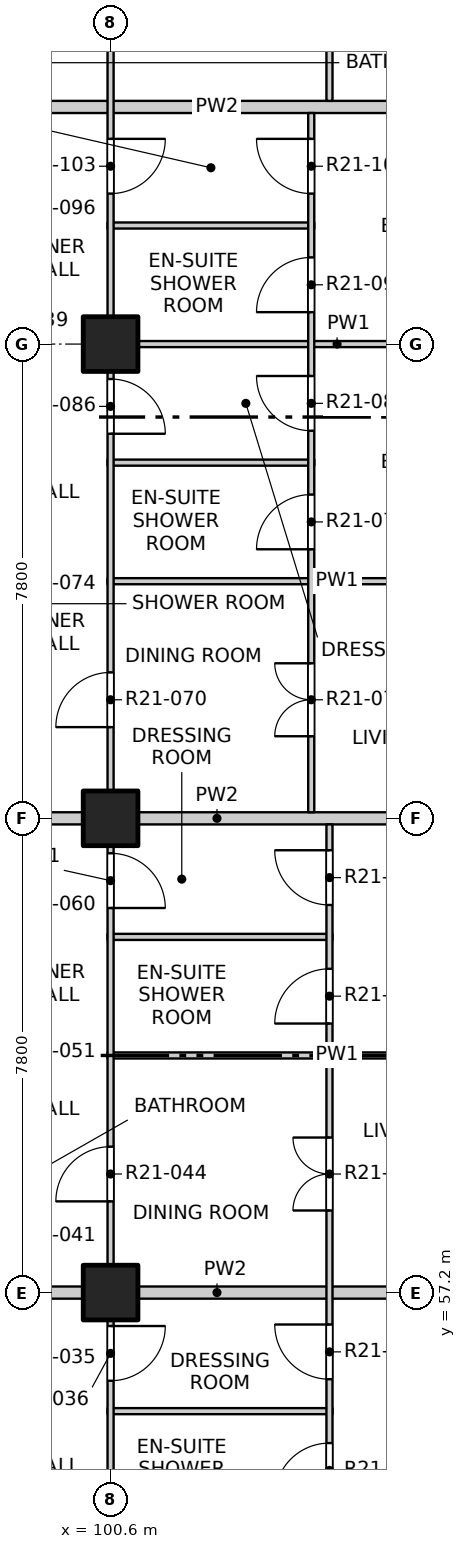
"""IFC4 building model, lengths in metres.
Left out: names, types, materials, properties, quantities, classifications, styles, units other than length and angle.
Written with IfcOpenShell. Run it as: python <this file> out.ifc"""

import sys

from ifc_helpers import new_model, si_unit, direction, frame, frame_2d, origin, origin_2d, place, context, subcontext, project, spatial, rectangle, extrude, element, fill, save


model = new_model("IFC4")
c1 = context("Model", 3, precision=1e-05, world=origin(), true_north=direction((0.0, 1.0)))
c2 = subcontext(c1, "Body", "Model", "MODEL_VIEW")
j1 = project(units=[si_unit("LENGTHUNIT", "METRE"), si_unit("PLANEANGLEUNIT", "RADIAN")], contexts=[c1])
p1 = place(None, origin())
s1 = spatial("IfcSite", under=j1, at=p1, CompositionType="ELEMENT")
p2 = place(p1, origin())
s2 = spatial("IfcBuilding", under=s1, at=p2, CompositionType="ELEMENT")
p3 = place(p2, frame((0.0, 0.0, 221.1)))
s3 = spatial("IfcBuildingStorey", under=s2, at=p3, CompositionType="ELEMENT", Elevation=221.1)
for number, where, z_axis, x_axis in (
    (1, (100.6, 57.2, -0.25), (0.0, 0.0, 1.0), (1.0, 0.0, 0.0)),
    (2, (100.6, 65.0, -0.25), (0.0, 0.0, 1.0), (1.0, 0.0, 0.0)),
    (3, (100.6, 72.8, -0.25), (0.0, 0.0, 1.0), (1.0, 0.0, 0.0)),
):
    element("IfcColumn", number, at=place(p3, frame(where, z_axis=z_axis, x_axis=x_axis)), inside=s3, PredefinedType="COLUMN", context=c2, shape_type="SweptSolid", body=[
        extrude(rectangle(XDim=0.9, YDim=0.9, at=origin_2d()), origin(), (0.0, 0.0, 1.0), 3.4),
    ])
p4 = place(p3, frame((100.55, 55.25, 0.0), z_axis=(0.0, 0.0, 1.0), x_axis=(1.0, 0.0, 0.0)))
e4 = element("IfcWall", 4, at=p4, inside=s3, PredefinedType="PARTITIONING", context=c2, shape_type="SweptSolid", body=[
    extrude(rectangle(XDim=3.7, YDim=0.1, at=frame_2d((1.85, 0.0))), origin(), (0.0, 0.0, 1.0), 3.15),
])
p5 = place(p3, frame((96.6, 57.2, 0.0), z_axis=(0.0, 0.0, 1.0), x_axis=(1.0, 0.0, 0.0)))
e5 = element("IfcWall", 5, at=p5, inside=s3, PredefinedType="PARTITIONING", context=c2, shape_type="SweptSolid", body=[
    extrude(rectangle(XDim=11.5, YDim=0.2, at=frame_2d((5.75, 0.0))), origin(), (0.0, 0.0, 1.0), 3.15),
])
p6 = place(p3, frame((100.55, 61.1, 0.0), z_axis=(0.0, 0.0, 1.0), x_axis=(1.0, 0.0, 0.0)))
e6 = element("IfcWall", 6, at=p6, inside=s3, PredefinedType="PARTITIONING", context=c2, shape_type="SweptSolid", body=[
    extrude(rectangle(XDim=7.55, YDim=0.1, at=frame_2d((3.775, 0.0))), origin(), (0.0, 0.0, 1.0), 2.55),
])
p7 = place(p3, frame((100.55, 63.05, 0.0), z_axis=(0.0, 0.0, 1.0), x_axis=(1.0, 0.0, 0.0)))
e7 = element("IfcWall", 7, at=p7, inside=s3, PredefinedType="PARTITIONING", context=c2, shape_type="SweptSolid", body=[
    extrude(rectangle(XDim=3.7, YDim=0.1, at=frame_2d((1.85, 0.0))), origin(), (0.0, 0.0, 1.0), 3.15),
])
p8 = place(p3, frame((96.6, 65.0, 0.0), z_axis=(0.0, 0.0, 1.0), x_axis=(1.0, 0.0, 0.0)))
e8 = element("IfcWall", 8, at=p8, inside=s3, PredefinedType="PARTITIONING", context=c2, shape_type="SweptSolid", body=[
    extrude(rectangle(XDim=11.5, YDim=0.2, at=frame_2d((5.75, 0.0))), origin(), (0.0, 0.0, 1.0), 3.15),
])
p9 = place(p3, frame((100.55, 68.9, 0.0), z_axis=(0.0, 0.0, 1.0), x_axis=(1.0, 0.0, 0.0)))
e9 = element("IfcWall", 9, at=p9, inside=s3, PredefinedType="PARTITIONING", context=c2, shape_type="SweptSolid", body=[
    extrude(rectangle(XDim=7.55, YDim=0.1, at=frame_2d((3.775, 0.0))), origin(), (0.0, 0.0, 1.0), 2.55),
])
p10 = place(p3, frame((100.55, 70.85, 0.0), z_axis=(0.0, 0.0, 1.0), x_axis=(1.0, 0.0, 0.0)))
e10 = element("IfcWall", 10, at=p10, inside=s3, PredefinedType="PARTITIONING", context=c2, shape_type="SweptSolid", body=[
    extrude(rectangle(XDim=3.4, YDim=0.1, at=frame_2d((1.7, 0.0))), origin(), (0.0, 0.0, 1.0), 3.15),
])
p11 = place(p3, frame((100.55, 72.8, 0.0), z_axis=(0.0, 0.0, 1.0), x_axis=(1.0, 0.0, 0.0)))
e11 = element("IfcWall", 11, at=p11, inside=s3, PredefinedType="PARTITIONING", context=c2, shape_type="SweptSolid", body=[
    extrude(rectangle(XDim=7.55, YDim=0.1, at=frame_2d((3.775, 0.0))), origin(), (0.0, 0.0, 1.0), 3.15),
])
p12 = place(p3, frame((100.55, 74.75, 0.0), z_axis=(0.0, 0.0, 1.0), x_axis=(1.0, 0.0, 0.0)))
e12 = element("IfcWall", 12, at=p12, inside=s3, PredefinedType="PARTITIONING", context=c2, shape_type="SweptSolid", body=[
    extrude(rectangle(XDim=3.4, YDim=0.1, at=frame_2d((1.7, 0.0))), origin(), (0.0, 0.0, 1.0), 3.15),
])
p13 = place(p3, frame((96.6, 76.7, 0.0), z_axis=(0.0, 0.0, 1.0), x_axis=(1.0, 0.0, 0.0)))
e13 = element("IfcWall", 13, at=p13, inside=s3, PredefinedType="PARTITIONING", context=c2, shape_type="SweptSolid", body=[
    extrude(rectangle(XDim=11.5, YDim=0.2, at=frame_2d((5.75, 0.0))), origin(), (0.0, 0.0, 1.0), 2.55),
])
p14 = place(p3, frame((100.6, 41.9, 0.0), z_axis=(0.0, 0.0, 1.0), x_axis=(0.0, 1.0, 0.0)))
e14 = element("IfcWall", 14, at=p14, inside=s3, PredefinedType="PARTITIONING", context=c2, shape_type="SweptSolid", body=[
    extrude(rectangle(XDim=46.2, YDim=0.1, at=frame_2d((23.1, 0.0))), origin(), (0.0, 0.0, 1.0), 3.15),
])
p15 = place(p14, frame((1.2, 0.0, 0.0)))
e15 = element("IfcOpeningElement", 15, at=p15, cuts=e14, PredefinedType="OPENING", context=c2, shape_type="SweptSolid", body=[
    extrude(rectangle(XDim=0.9, YDim=2.1, at=frame_2d((0.45, 1.05))), frame((0.0, 0.06, 0.0), z_axis=(0.0, -1.0, 0.0), x_axis=(1.0, 0.0, 0.0)), (0.0, 0.0, 1.0), 0.12),
])
p16 = place(p14, frame((6.025, 0.0, 0.0)))
e16 = element("IfcOpeningElement", 16, at=p16, cuts=e14, PredefinedType="OPENING", context=c2, shape_type="SweptSolid", body=[
    extrude(rectangle(XDim=0.9, YDim=2.1, at=frame_2d((0.45, 1.05))), frame((0.0, 0.06, 0.0), z_axis=(0.0, -1.0, 0.0), x_axis=(1.0, 0.0, 0.0)), (0.0, 0.0, 1.0), 0.12),
])
p17 = place(p14, frame((9.0, 0.0, 0.0)))
e17 = element("IfcOpeningElement", 17, at=p17, cuts=e14, PredefinedType="OPENING", context=c2, shape_type="SweptSolid", body=[
    extrude(rectangle(XDim=0.9, YDim=2.1, at=frame_2d((0.45, 1.05))), frame((0.0, 0.06, 0.0), z_axis=(0.0, -1.0, 0.0), x_axis=(1.0, 0.0, 0.0)), (0.0, 0.0, 1.0), 0.12),
])
p18 = place(p14, frame((13.85, 0.0, 0.0)))
e18 = element("IfcOpeningElement", 18, at=p18, cuts=e14, PredefinedType="OPENING", context=c2, shape_type="SweptSolid", body=[
    extrude(rectangle(XDim=0.9, YDim=2.1, at=frame_2d((0.45, 1.05))), frame((0.0, 0.06, 0.0), z_axis=(0.0, -1.0, 0.0), x_axis=(1.0, 0.0, 0.0)), (0.0, 0.0, 1.0), 0.12),
])
p19 = place(p14, frame((16.8, 0.0, 0.0)))
e19 = element("IfcOpeningElement", 19, at=p19, cuts=e14, PredefinedType="OPENING", context=c2, shape_type="SweptSolid", body=[
    extrude(rectangle(XDim=0.9, YDim=2.1, at=frame_2d((0.45, 1.05))), frame((0.0, 0.06, 0.0), z_axis=(0.0, -1.0, 0.0), x_axis=(1.0, 0.0, 0.0)), (0.0, 0.0, 1.0), 0.12),
])
p20 = place(p14, frame((21.625, 0.0, 0.0)))
e20 = element("IfcOpeningElement", 20, at=p20, cuts=e14, PredefinedType="OPENING", context=c2, shape_type="SweptSolid", body=[
    extrude(rectangle(XDim=0.9, YDim=2.1, at=frame_2d((0.45, 1.05))), frame((0.0, 0.06, 0.0), z_axis=(0.0, -1.0, 0.0), x_axis=(1.0, 0.0, 0.0)), (0.0, 0.0, 1.0), 0.12),
])
p21 = place(p14, frame((24.6, 0.0, 0.0)))
e21 = element("IfcOpeningElement", 21, at=p21, cuts=e14, PredefinedType="OPENING", context=c2, shape_type="SweptSolid", body=[
    extrude(rectangle(XDim=0.9, YDim=2.1, at=frame_2d((0.45, 1.05))), frame((0.0, 0.06, 0.0), z_axis=(0.0, -1.0, 0.0), x_axis=(1.0, 0.0, 0.0)), (0.0, 0.0, 1.0), 0.12),
])
p22 = place(p14, frame((29.425, 0.0, 0.0)))
e22 = element("IfcOpeningElement", 22, at=p22, cuts=e14, PredefinedType="OPENING", context=c2, shape_type="SweptSolid", body=[
    extrude(rectangle(XDim=0.9, YDim=2.1, at=frame_2d((0.45, 1.05))), frame((0.0, 0.06, 0.0), z_axis=(0.0, -1.0, 0.0), x_axis=(1.0, 0.0, 0.0)), (0.0, 0.0, 1.0), 0.12),
])
p23 = place(p14, frame((33.375, 0.0, 0.0)))
e23 = element("IfcOpeningElement", 23, at=p23, cuts=e14, PredefinedType="OPENING", context=c2, shape_type="SweptSolid", body=[
    extrude(rectangle(XDim=0.9, YDim=2.1, at=frame_2d((0.45, 1.05))), frame((0.0, 0.06, 0.0), z_axis=(0.0, -1.0, 0.0), x_axis=(1.0, 0.0, 0.0)), (0.0, 0.0, 1.0), 0.12),
])
p24 = place(p14, frame((36.3, 0.0, 0.0)))
e24 = element("IfcOpeningElement", 24, at=p24, cuts=e14, PredefinedType="OPENING", context=c2, shape_type="SweptSolid", body=[
    extrude(rectangle(XDim=0.9, YDim=2.1, at=frame_2d((0.45, 1.05))), frame((0.0, 0.06, 0.0), z_axis=(0.0, -1.0, 0.0), x_axis=(1.0, 0.0, 0.0)), (0.0, 0.0, 1.0), 0.12),
])
p25 = place(p14, frame((41.175, 0.0, 0.0)))
e25 = element("IfcOpeningElement", 25, at=p25, cuts=e14, PredefinedType="OPENING", context=c2, shape_type="SweptSolid", body=[
    extrude(rectangle(XDim=0.9, YDim=2.1, at=frame_2d((0.45, 1.05))), frame((0.0, 0.06, 0.0), z_axis=(0.0, -1.0, 0.0), x_axis=(1.0, 0.0, 0.0)), (0.0, 0.0, 1.0), 0.12),
])
p26 = place(p14, frame((44.1, 0.0, 0.0)))
e26 = element("IfcOpeningElement", 26, at=p26, cuts=e14, PredefinedType="OPENING", context=c2, shape_type="SweptSolid", body=[
    extrude(rectangle(XDim=0.9, YDim=2.1, at=frame_2d((0.45, 1.05))), frame((0.0, 0.06, 0.0), z_axis=(0.0, -1.0, 0.0), x_axis=(1.0, 0.0, 0.0)), (0.0, 0.0, 1.0), 0.12),
])
p27 = place(p3, frame((103.9, 65.1, 0.0), z_axis=(0.0, 0.0, 1.0), x_axis=(0.0, 1.0, 0.0)))
e27 = element("IfcWall", 27, at=p27, inside=s3, PredefinedType="PARTITIONING", context=c2, shape_type="SweptSolid", body=[
    extrude(rectangle(XDim=11.5, YDim=0.1, at=frame_2d((5.75, 0.0))), origin(), (0.0, 0.0, 1.0), 3.15),
])
p28 = place(p27, frame((1.25, 0.0, 0.0)))
e28 = element("IfcOpeningElement", 28, at=p28, cuts=e27, PredefinedType="OPENING", context=c2, shape_type="SweptSolid", body=[
    extrude(rectangle(XDim=1.2, YDim=2.1, at=frame_2d((0.6, 1.05))), frame((0.0, 0.06, 0.0), z_axis=(0.0, -1.0, 0.0), x_axis=(1.0, 0.0, 0.0)), (0.0, 0.0, 1.0), 0.12),
])
p29 = place(p27, frame((4.325, 0.0, 0.0)))
e29 = element("IfcOpeningElement", 29, at=p29, cuts=e27, PredefinedType="OPENING", context=c2, shape_type="SweptSolid", body=[
    extrude(rectangle(XDim=0.9, YDim=2.1, at=frame_2d((0.45, 1.05))), frame((0.0, 0.06, 0.0), z_axis=(0.0, -1.0, 0.0), x_axis=(1.0, 0.0, 0.0)), (0.0, 0.0, 1.0), 0.12),
])
p30 = place(p27, frame((6.275, 0.0, 0.0)))
e30 = element("IfcOpeningElement", 30, at=p30, cuts=e27, PredefinedType="OPENING", context=c2, shape_type="SweptSolid", body=[
    extrude(rectangle(XDim=0.9, YDim=2.1, at=frame_2d((0.45, 1.05))), frame((0.0, 0.06, 0.0), z_axis=(0.0, -1.0, 0.0), x_axis=(1.0, 0.0, 0.0)), (0.0, 0.0, 1.0), 0.12),
])
p31 = place(p27, frame((8.225, 0.0, 0.0)))
e31 = element("IfcOpeningElement", 31, at=p31, cuts=e27, PredefinedType="OPENING", context=c2, shape_type="SweptSolid", body=[
    extrude(rectangle(XDim=0.9, YDim=2.1, at=frame_2d((0.45, 1.05))), frame((0.0, 0.06, 0.0), z_axis=(0.0, -1.0, 0.0), x_axis=(1.0, 0.0, 0.0)), (0.0, 0.0, 1.0), 0.12),
])
p32 = place(p27, frame((10.175, 0.0, 0.0)))
e32 = element("IfcOpeningElement", 32, at=p32, cuts=e27, PredefinedType="OPENING", context=c2, shape_type="SweptSolid", body=[
    extrude(rectangle(XDim=0.9, YDim=2.1, at=frame_2d((0.45, 1.05))), frame((0.0, 0.06, 0.0), z_axis=(0.0, -1.0, 0.0), x_axis=(1.0, 0.0, 0.0)), (0.0, 0.0, 1.0), 0.12),
])
p33 = place(p3, frame((104.2, 41.9, 0.0), z_axis=(0.0, 0.0, 1.0), x_axis=(0.0, 1.0, 0.0)))
e33 = element("IfcWall", 33, at=p33, inside=s3, PredefinedType="PARTITIONING", context=c2, shape_type="SweptSolid", body=[
    extrude(rectangle(XDim=23.0, YDim=0.1, at=frame_2d((11.5, 0.0))), origin(), (0.0, 0.0, 1.0), 3.15),
])
p34 = place(p33, frame((1.05, 0.0, 0.0)))
e34 = element("IfcOpeningElement", 34, at=p34, cuts=e33, PredefinedType="OPENING", context=c2, shape_type="SweptSolid", body=[
    extrude(rectangle(XDim=1.2, YDim=2.1, at=frame_2d((0.6, 1.05))), frame((0.0, 0.06, 0.0), z_axis=(0.0, -1.0, 0.0), x_axis=(1.0, 0.0, 0.0)), (0.0, 0.0, 1.0), 0.12),
])
p35 = place(p33, frame((4.125, 0.0, 0.0)))
e35 = element("IfcOpeningElement", 35, at=p35, cuts=e33, PredefinedType="OPENING", context=c2, shape_type="SweptSolid", body=[
    extrude(rectangle(XDim=0.9, YDim=2.1, at=frame_2d((0.45, 1.05))), frame((0.0, 0.06, 0.0), z_axis=(0.0, -1.0, 0.0), x_axis=(1.0, 0.0, 0.0)), (0.0, 0.0, 1.0), 0.12),
])
p36 = place(p33, frame((6.075, 0.0, 0.0)))
e36 = element("IfcOpeningElement", 36, at=p36, cuts=e33, PredefinedType="OPENING", context=c2, shape_type="SweptSolid", body=[
    extrude(rectangle(XDim=0.9, YDim=2.1, at=frame_2d((0.45, 1.05))), frame((0.0, 0.06, 0.0), z_axis=(0.0, -1.0, 0.0), x_axis=(1.0, 0.0, 0.0)), (0.0, 0.0, 1.0), 0.12),
])
p37 = place(p33, frame((8.85, 0.0, 0.0)))
e37 = element("IfcOpeningElement", 37, at=p37, cuts=e33, PredefinedType="OPENING", context=c2, shape_type="SweptSolid", body=[
    extrude(rectangle(XDim=1.2, YDim=2.1, at=frame_2d((0.6, 1.05))), frame((0.0, 0.06, 0.0), z_axis=(0.0, -1.0, 0.0), x_axis=(1.0, 0.0, 0.0)), (0.0, 0.0, 1.0), 0.12),
])
p38 = place(p33, frame((11.925, 0.0, 0.0)))
e38 = element("IfcOpeningElement", 38, at=p38, cuts=e33, PredefinedType="OPENING", context=c2, shape_type="SweptSolid", body=[
    extrude(rectangle(XDim=0.9, YDim=2.1, at=frame_2d((0.45, 1.05))), frame((0.0, 0.06, 0.0), z_axis=(0.0, -1.0, 0.0), x_axis=(1.0, 0.0, 0.0)), (0.0, 0.0, 1.0), 0.12),
])
p39 = place(p33, frame((13.875, 0.0, 0.0)))
e39 = element("IfcOpeningElement", 39, at=p39, cuts=e33, PredefinedType="OPENING", context=c2, shape_type="SweptSolid", body=[
    extrude(rectangle(XDim=0.9, YDim=2.1, at=frame_2d((0.45, 1.05))), frame((0.0, 0.06, 0.0), z_axis=(0.0, -1.0, 0.0), x_axis=(1.0, 0.0, 0.0)), (0.0, 0.0, 1.0), 0.12),
])
p40 = place(p33, frame((16.65, 0.0, 0.0)))
e40 = element("IfcOpeningElement", 40, at=p40, cuts=e33, PredefinedType="OPENING", context=c2, shape_type="SweptSolid", body=[
    extrude(rectangle(XDim=1.2, YDim=2.1, at=frame_2d((0.6, 1.05))), frame((0.0, 0.06, 0.0), z_axis=(0.0, -1.0, 0.0), x_axis=(1.0, 0.0, 0.0)), (0.0, 0.0, 1.0), 0.12),
])
p41 = place(p33, frame((19.725, 0.0, 0.0)))
e41 = element("IfcOpeningElement", 41, at=p41, cuts=e33, PredefinedType="OPENING", context=c2, shape_type="SweptSolid", body=[
    extrude(rectangle(XDim=0.9, YDim=2.1, at=frame_2d((0.45, 1.05))), frame((0.0, 0.06, 0.0), z_axis=(0.0, -1.0, 0.0), x_axis=(1.0, 0.0, 0.0)), (0.0, 0.0, 1.0), 0.12),
])
p42 = place(p33, frame((21.675, 0.0, 0.0)))
e42 = element("IfcOpeningElement", 42, at=p42, cuts=e33, PredefinedType="OPENING", context=c2, shape_type="SweptSolid", body=[
    extrude(rectangle(XDim=0.9, YDim=2.1, at=frame_2d((0.45, 1.05))), frame((0.0, 0.06, 0.0), z_axis=(0.0, -1.0, 0.0), x_axis=(1.0, 0.0, 0.0)), (0.0, 0.0, 1.0), 0.12),
])
p43 = place(p3, frame((104.2, 76.8, 0.0), z_axis=(0.0, 0.0, 1.0), x_axis=(0.0, 1.0, 0.0)))
e43 = element("IfcWall", 43, at=p43, inside=s3, PredefinedType="PARTITIONING", context=c2, shape_type="SweptSolid", body=[
    extrude(rectangle(XDim=11.3, YDim=0.1, at=frame_2d((5.65, 0.0))), origin(), (0.0, 0.0, 1.0), 3.15),
])
p44 = place(p43, frame((1.25, 0.0, 0.0)))
e44 = element("IfcOpeningElement", 44, at=p44, cuts=e43, PredefinedType="OPENING", context=c2, shape_type="SweptSolid", body=[
    extrude(rectangle(XDim=1.2, YDim=2.1, at=frame_2d((0.6, 1.05))), frame((0.0, 0.06, 0.0), z_axis=(0.0, -1.0, 0.0), x_axis=(1.0, 0.0, 0.0)), (0.0, 0.0, 1.0), 0.12),
])
p45 = place(p43, frame((4.325, 0.0, 0.0)))
e45 = element("IfcOpeningElement", 45, at=p45, cuts=e43, PredefinedType="OPENING", context=c2, shape_type="SweptSolid", body=[
    extrude(rectangle(XDim=0.9, YDim=2.1, at=frame_2d((0.45, 1.05))), frame((0.0, 0.06, 0.0), z_axis=(0.0, -1.0, 0.0), x_axis=(1.0, 0.0, 0.0)), (0.0, 0.0, 1.0), 0.12),
])
p46 = place(p43, frame((6.275, 0.0, 0.0)))
e46 = element("IfcOpeningElement", 46, at=p46, cuts=e43, PredefinedType="OPENING", context=c2, shape_type="SweptSolid", body=[
    extrude(rectangle(XDim=0.9, YDim=2.1, at=frame_2d((0.45, 1.05))), frame((0.0, 0.06, 0.0), z_axis=(0.0, -1.0, 0.0), x_axis=(1.0, 0.0, 0.0)), (0.0, 0.0, 1.0), 0.12),
])
p47 = place(p43, frame((9.05, 0.0, 0.0)))
e47 = element("IfcOpeningElement", 47, at=p47, cuts=e43, PredefinedType="OPENING", context=c2, shape_type="SweptSolid", body=[
    extrude(rectangle(XDim=1.2, YDim=2.1, at=frame_2d((0.6, 1.05))), frame((0.0, 0.06, 0.0), z_axis=(0.0, -1.0, 0.0), x_axis=(1.0, 0.0, 0.0)), (0.0, 0.0, 1.0), 0.12),
])
p48 = place(p38, origin())
e48 = element("IfcDoor", 48, at=p48, inside=s3, OperationType="SINGLE_SWING_LEFT", PredefinedType="DOOR", context=c2, shape_type="SweptSolid", body=[
    extrude(rectangle(XDim=0.9, YDim=2.1, at=frame_2d((0.45, 1.05))), frame((0.0, 0.025, 0.0), z_axis=(0.0, -1.0, 0.0), x_axis=(1.0, 0.0, 0.0)), (0.0, 0.0, 1.0), 0.05),
])
fill(e38, e48)
p49 = place(p18, origin())
e49 = element("IfcDoor", 49, at=p49, inside=s3, OperationType="SINGLE_SWING_LEFT", PredefinedType="DOOR", context=c2, shape_type="SweptSolid", body=[
    extrude(rectangle(XDim=0.9, YDim=2.1, at=frame_2d((0.45, 1.05))), frame((0.0, 0.025, 0.0), z_axis=(0.0, -1.0, 0.0), x_axis=(1.0, 0.0, 0.0)), (0.0, 0.0, 1.0), 0.05),
])
fill(e18, e49)
p50 = place(p39, origin())
e50 = element("IfcDoor", 50, at=p50, inside=s3, OperationType="SINGLE_SWING_RIGHT", PredefinedType="DOOR", context=c2, shape_type="SweptSolid", body=[
    extrude(rectangle(XDim=0.9, YDim=2.1, at=frame_2d((0.45, 1.05))), frame((0.0, 0.025, 0.0), z_axis=(0.0, -1.0, 0.0), x_axis=(1.0, 0.0, 0.0)), (0.0, 0.0, 1.0), 0.05),
])
fill(e39, e50)
p51 = place(p19, origin())
e51 = element("IfcDoor", 51, at=p51, inside=s3, OperationType="SINGLE_SWING_LEFT", PredefinedType="DOOR", context=c2, shape_type="SweptSolid", body=[
    extrude(rectangle(XDim=0.9, YDim=2.1, at=frame_2d((0.45, 1.05))), frame((0.0, 0.025, 0.0), z_axis=(0.0, -1.0, 0.0), x_axis=(1.0, 0.0, 0.0)), (0.0, 0.0, 1.0), 0.05),
])
fill(e19, e51)
p52 = place(p40, origin())
e52 = element("IfcDoor", 52, at=p52, inside=s3, OperationType="DOUBLE_DOOR_SINGLE_SWING", PredefinedType="DOOR", context=c2, shape_type="SweptSolid", body=[
    extrude(rectangle(XDim=1.2, YDim=2.1, at=frame_2d((0.6, 1.05))), frame((0.0, 0.025, 0.0), z_axis=(0.0, -1.0, 0.0), x_axis=(1.0, 0.0, 0.0)), (0.0, 0.0, 1.0), 0.05),
])
fill(e40, e52)
p53 = place(p41, origin())
e53 = element("IfcDoor", 53, at=p53, inside=s3, OperationType="SINGLE_SWING_LEFT", PredefinedType="DOOR", context=c2, shape_type="SweptSolid", body=[
    extrude(rectangle(XDim=0.9, YDim=2.1, at=frame_2d((0.45, 1.05))), frame((0.0, 0.025, 0.0), z_axis=(0.0, -1.0, 0.0), x_axis=(1.0, 0.0, 0.0)), (0.0, 0.0, 1.0), 0.05),
])
fill(e41, e53)
p54 = place(p20, origin())
e54 = element("IfcDoor", 54, at=p54, inside=s3, OperationType="SINGLE_SWING_RIGHT", PredefinedType="DOOR", context=c2, shape_type="SweptSolid", body=[
    extrude(rectangle(XDim=0.9, YDim=2.1, at=frame_2d((0.45, 1.05))), frame((0.0, 0.025, 0.0), z_axis=(0.0, -1.0, 0.0), x_axis=(1.0, 0.0, 0.0)), (0.0, 0.0, 1.0), 0.05),
])
fill(e20, e54)
p55 = place(p42, origin())
e55 = element("IfcDoor", 55, at=p55, inside=s3, OperationType="SINGLE_SWING_RIGHT", PredefinedType="DOOR", context=c2, shape_type="SweptSolid", body=[
    extrude(rectangle(XDim=0.9, YDim=2.1, at=frame_2d((0.45, 1.05))), frame((0.0, 0.025, 0.0), z_axis=(0.0, -1.0, 0.0), x_axis=(1.0, 0.0, 0.0)), (0.0, 0.0, 1.0), 0.05),
])
fill(e42, e55)
p56 = place(p21, origin())
e56 = element("IfcDoor", 56, at=p56, inside=s3, OperationType="SINGLE_SWING_LEFT", PredefinedType="DOOR", context=c2, shape_type="SweptSolid", body=[
    extrude(rectangle(XDim=0.9, YDim=2.1, at=frame_2d((0.45, 1.05))), frame((0.0, 0.025, 0.0), z_axis=(0.0, -1.0, 0.0), x_axis=(1.0, 0.0, 0.0)), (0.0, 0.0, 1.0), 0.05),
])
fill(e21, e56)
p57 = place(p28, origin())
e57 = element("IfcDoor", 57, at=p57, inside=s3, OperationType="DOUBLE_DOOR_SINGLE_SWING", PredefinedType="DOOR", context=c2, shape_type="SweptSolid", body=[
    extrude(rectangle(XDim=1.2, YDim=2.1, at=frame_2d((0.6, 1.05))), frame((0.0, 0.025, 0.0), z_axis=(0.0, -1.0, 0.0), x_axis=(1.0, 0.0, 0.0)), (0.0, 0.0, 1.0), 0.05),
])
fill(e28, e57)
p58 = place(p29, origin())
e58 = element("IfcDoor", 58, at=p58, inside=s3, OperationType="SINGLE_SWING_LEFT", PredefinedType="DOOR", context=c2, shape_type="SweptSolid", body=[
    extrude(rectangle(XDim=0.9, YDim=2.1, at=frame_2d((0.45, 1.05))), frame((0.0, 0.025, 0.0), z_axis=(0.0, -1.0, 0.0), x_axis=(1.0, 0.0, 0.0)), (0.0, 0.0, 1.0), 0.05),
])
fill(e29, e58)
p59 = place(p22, origin())
e59 = element("IfcDoor", 59, at=p59, inside=s3, OperationType="SINGLE_SWING_RIGHT", PredefinedType="DOOR", context=c2, shape_type="SweptSolid", body=[
    extrude(rectangle(XDim=0.9, YDim=2.1, at=frame_2d((0.45, 1.05))), frame((0.0, 0.025, 0.0), z_axis=(0.0, -1.0, 0.0), x_axis=(1.0, 0.0, 0.0)), (0.0, 0.0, 1.0), 0.05),
])
fill(e22, e59)
p60 = place(p30, origin())
e60 = element("IfcDoor", 60, at=p60, inside=s3, OperationType="SINGLE_SWING_RIGHT", PredefinedType="DOOR", context=c2, shape_type="SweptSolid", body=[
    extrude(rectangle(XDim=0.9, YDim=2.1, at=frame_2d((0.45, 1.05))), frame((0.0, 0.025, 0.0), z_axis=(0.0, -1.0, 0.0), x_axis=(1.0, 0.0, 0.0)), (0.0, 0.0, 1.0), 0.05),
])
fill(e30, e60)
p61 = place(p31, origin())
e61 = element("IfcDoor", 61, at=p61, inside=s3, OperationType="SINGLE_SWING_LEFT", PredefinedType="DOOR", context=c2, shape_type="SweptSolid", body=[
    extrude(rectangle(XDim=0.9, YDim=2.1, at=frame_2d((0.45, 1.05))), frame((0.0, 0.025, 0.0), z_axis=(0.0, -1.0, 0.0), x_axis=(1.0, 0.0, 0.0)), (0.0, 0.0, 1.0), 0.05),
])
fill(e31, e61)
p62 = place(p23, origin())
e62 = element("IfcDoor", 62, at=p62, inside=s3, OperationType="SINGLE_SWING_LEFT", PredefinedType="DOOR", context=c2, shape_type="SweptSolid", body=[
    extrude(rectangle(XDim=0.9, YDim=2.1, at=frame_2d((0.45, 1.05))), frame((0.0, 0.025, 0.0), z_axis=(0.0, -1.0, 0.0), x_axis=(1.0, 0.0, 0.0)), (0.0, 0.0, 1.0), 0.05),
])
fill(e23, e62)
p63 = place(p32, origin())
e63 = element("IfcDoor", 63, at=p63, inside=s3, OperationType="SINGLE_SWING_RIGHT", PredefinedType="DOOR", context=c2, shape_type="SweptSolid", body=[
    extrude(rectangle(XDim=0.9, YDim=2.1, at=frame_2d((0.45, 1.05))), frame((0.0, 0.025, 0.0), z_axis=(0.0, -1.0, 0.0), x_axis=(1.0, 0.0, 0.0)), (0.0, 0.0, 1.0), 0.05),
])
fill(e32, e63)
save(model, sys.argv[1])
